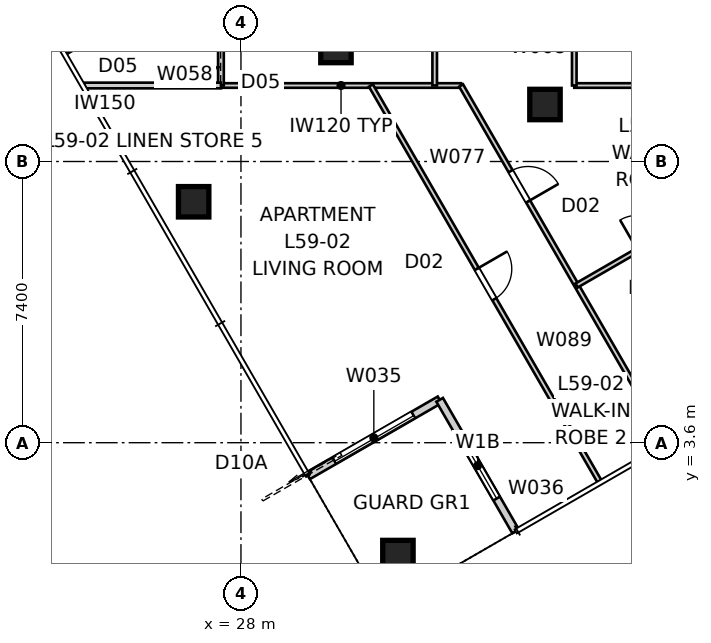
"""IFC4 building model, lengths in metres.
Left out: names, types, materials, properties, quantities, classifications, styles, units other than length and angle.
Written with IfcOpenShell. Run it as: python <this file> out.ifc"""

import sys

from ifc_helpers import new_model, si_unit, direction, frame, frame_2d, origin, origin_2d, place, context, subcontext, project, spatial, rectangle, extrude, element, fill, save


model = new_model("IFC4")
c1 = context("Model", 3, precision=1e-05, world=origin(), true_north=direction((0.0, 1.0)))
c2 = subcontext(c1, "Body", "Model", "MODEL_VIEW")
j1 = project(units=[si_unit("LENGTHUNIT", "METRE"), si_unit("PLANEANGLEUNIT", "RADIAN")], contexts=[c1])
p1 = place(None, origin())
s1 = spatial("IfcSite", under=j1, at=p1, CompositionType="ELEMENT")
p2 = place(p1, origin())
s2 = spatial("IfcBuilding", under=s1, at=p2, CompositionType="ELEMENT")
p3 = place(p2, frame((0.0, 0.0, 215.0)))
s3 = spatial("IfcBuildingStorey", under=s2, at=p3, CompositionType="ELEMENT", Elevation=215.0)
for number, where, z_axis, x_axis in (
    (1, (32.13, 0.63, 0.0), (0.0, 0.0, 1.0), (1.0, 0.0, 0.0)),
    (2, (26.755, 9.94, 0.0), (0.0, 0.0, 1.0), (1.0, 0.0, 0.0)),
    (3, (30.5, 14.0, 0.0), (0.0, 0.0, 1.0), (1.0, 0.0, 0.0)),
    (4, (36.0, 12.5, 0.0), (0.0, 0.0, 1.0), (1.0, 0.0, 0.0)),
):
    element("IfcColumn", number, at=place(p3, frame(where, z_axis=z_axis, x_axis=x_axis)), inside=s3, PredefinedType="COLUMN", context=c2, shape_type="SweptSolid", body=[
        extrude(rectangle(XDim=0.8, YDim=0.8, at=origin_2d()), origin(), (0.0, 0.0, 1.0), 3.4),
    ])
p4 = place(p3, frame((29.764, 2.729, 0.0), z_axis=(0.0, 0.0, 1.0), x_axis=(0.866026010844, 0.49999894854, 0.0)))
e5 = element("IfcWall", 5, at=p4, inside=s3, PredefinedType="SOLIDWALL", context=c2, shape_type="SweptSolid", body=[
    extrude(rectangle(XDim=4.0, YDim=0.2, at=frame_2d((2.0, 0.0))), origin(), (0.0, 0.0, 1.0), 3.25),
])
p5 = place(p4, frame((0.8, 0.0, 0.0)))
e6 = element("IfcOpeningElement", 6, at=p5, cuts=e5, PredefinedType="OPENING", context=c2, shape_type="SweptSolid", body=[
    extrude(rectangle(XDim=2.4, YDim=2.1, at=frame_2d((1.2, 1.05))), frame((0.0, 0.11, 0.0), z_axis=(0.0, -1.0, 0.0), x_axis=(1.0, 0.0, 0.0)), (0.0, 0.0, 1.0), 0.22),
])
p6 = place(p3, frame((33.229, 4.729, 0.0), z_axis=(0.0, 0.0, 1.0), x_axis=(0.49999894854, -0.866026010844, 0.0)))
e7 = element("IfcWall", 7, at=p6, inside=s3, PredefinedType="SOLIDWALL", context=c2, shape_type="SweptSolid", body=[
    extrude(rectangle(XDim=4.0, YDim=0.2, at=frame_2d((2.0, 0.0))), origin(), (0.0, 0.0, 1.0), 3.25),
])
p7 = place(p6, frame((1.0, 0.0, 0.45)))
e8 = element("IfcOpeningElement", 8, at=p7, cuts=e7, PredefinedType="OPENING", context=c2, shape_type="SweptSolid", body=[
    extrude(rectangle(XDim=2.0, YDim=1.8, at=frame_2d((1.0, 0.9))), frame((0.0, 0.11, 0.0), z_axis=(0.0, -1.0, 0.0), x_axis=(1.0, 0.0, 0.0)), (0.0, 0.0, 1.0), 0.22),
])
p8 = place(p3, frame((33.793, 13.0, 0.0), z_axis=(0.0, 0.0, 1.0), x_axis=(-1.0, 0.0, 0.0)))
e9 = element("IfcWall", 9, at=p8, inside=s3, PredefinedType="PARTITIONING", context=c2, shape_type="SweptSolid", body=[
    extrude(rectangle(XDim=6.32, YDim=0.12, at=frame_2d((3.16, 0.0))), origin(), (0.0, 0.0, 1.0), 3.25),
])
p9 = place(p3, frame((33.098, 17.9, 0.0), z_axis=(0.0, 0.0, 1.0), x_axis=(0.0, -1.0, 0.0)))
e10 = element("IfcWall", 10, at=p9, inside=s3, PredefinedType="PARTITIONING", context=c2, shape_type="SweptSolid", body=[
    extrude(rectangle(XDim=4.9, YDim=0.12, at=frame_2d((2.45, 0.0))), origin(), (0.0, 0.0, 1.0), 3.25),
])
p10 = place(p9, frame((3.018, 0.0, 0.0)))
e11 = element("IfcOpeningElement", 11, at=p10, cuts=e10, PredefinedType="OPENING", context=c2, shape_type="SweptSolid", body=[
    extrude(rectangle(XDim=0.96, YDim=2.1, at=frame_2d((0.48, 1.05))), frame((0.0, 0.07, 0.0), z_axis=(0.0, -1.0, 0.0), x_axis=(1.0, 0.0, 0.0)), (0.0, 0.0, 1.0), 0.14),
])
p11 = place(p9, frame((0.588, 0.0, 0.0)))
e12 = element("IfcOpeningElement", 12, at=p11, cuts=e10, PredefinedType="OPENING", context=c2, shape_type="SweptSolid", body=[
    extrude(rectangle(XDim=0.92, YDim=2.34, at=frame_2d((0.46, 1.17))), frame((0.0, 0.07, 0.0), z_axis=(0.0, -1.0, 0.0), x_axis=(1.0, 0.0, 0.0)), (0.0, 0.0, 1.0), 0.14),
])
p12 = place(p3, frame((27.473, 13.0, 0.0), z_axis=(0.0, 0.0, 1.0), x_axis=(0.0, 1.0, 0.0)))
e13 = element("IfcWall", 13, at=p12, inside=s3, PredefinedType="SOLIDWALL", context=c2, shape_type="SweptSolid", body=[
    extrude(rectangle(XDim=3.314, YDim=0.15, at=frame_2d((1.657, 0.0))), origin(), (0.0, 0.0, 1.0), 3.25),
])
p13 = place(p12, frame((0.922, 0.0, 0.0)))
e14 = element("IfcOpeningElement", 14, at=p13, cuts=e13, PredefinedType="OPENING", context=c2, shape_type="SweptSolid", body=[
    extrude(rectangle(XDim=0.96, YDim=2.1, at=frame_2d((0.48, 1.05))), frame((0.0, 0.085, 0.0), z_axis=(0.0, -1.0, 0.0), x_axis=(1.0, 0.0, 0.0)), (0.0, 0.0, 1.0), 0.17),
])
p14 = place(p3, frame((27.473, 16.256, 0.0), z_axis=(0.0, 0.0, 1.0), x_axis=(-0.866047486323, -0.49996174997, 0.0)))
e15 = element("IfcWall", 15, at=p14, inside=s3, PredefinedType="SOLIDWALL", context=c2, shape_type="SweptSolid", body=[
    extrude(rectangle(XDim=4.74, YDim=0.15, at=frame_2d((2.37, 0.0))), origin(), (0.0, 0.0, 1.0), 3.25),
])
p15 = place(p14, frame((1.91, 0.0, 0.0)))
e16 = element("IfcOpeningElement", 16, at=p15, cuts=e15, PredefinedType="OPENING", context=c2, shape_type="SweptSolid", body=[
    extrude(rectangle(XDim=0.96, YDim=2.1, at=frame_2d((0.48, 1.05))), frame((0.0, 0.085, 0.0), z_axis=(0.0, -1.0, 0.0), x_axis=(1.0, 0.0, 0.0)), (0.0, 0.0, 1.0), 0.17),
])
p16 = place(p3, frame((39.192, 13.0, 0.0), z_axis=(0.0, 0.0, 1.0), x_axis=(-1.0, 0.0, 0.0)))
e17 = element("IfcWall", 17, at=p16, inside=s3, PredefinedType="PARTITIONING", context=c2, shape_type="SweptSolid", body=[
    extrude(rectangle(XDim=2.421, YDim=0.12, at=frame_2d((1.21, 0.0))), origin(), (0.0, 0.0, 1.0), 3.25),
])
p17 = place(p3, frame((36.771, 13.0, 0.0), z_axis=(0.0, 0.0, 1.0), x_axis=(0.0, 1.0, 0.0)))
e18 = element("IfcWall", 18, at=p17, inside=s3, PredefinedType="PARTITIONING", context=c2, shape_type="SweptSolid", body=[
    extrude(rectangle(XDim=4.9, YDim=0.12, at=frame_2d((2.45, 0.0))), origin(), (0.0, 0.0, 1.0), 3.25),
])
p18 = place(p17, frame((1.97, 0.0, 0.0)))
e19 = element("IfcOpeningElement", 19, at=p18, cuts=e18, PredefinedType="OPENING", context=c2, shape_type="SweptSolid", body=[
    extrude(rectangle(XDim=0.96, YDim=2.1, at=frame_2d((0.48, 1.05))), frame((0.0, 0.07, 0.0), z_axis=(0.0, -1.0, 0.0), x_axis=(1.0, 0.0, 0.0)), (0.0, 0.0, 1.0), 0.14),
])
p19 = place(p3, frame((31.419, 13.0, 0.0), z_axis=(0.0, 0.0, 1.0), x_axis=(0.499996550604, -0.866027395285, 0.0)))
e20 = element("IfcWall", 20, at=p19, inside=s3, PredefinedType="PARTITIONING", context=c2, shape_type="SweptSolid", body=[
    extrude(rectangle(XDim=12.028, YDim=0.12, at=frame_2d((6.014, 0.0))), origin(), (0.0, 0.0, 1.0), 3.25),
])
p20 = place(p19, frame((5.574, 0.0, 0.0)))
e21 = element("IfcOpeningElement", 21, at=p20, cuts=e20, PredefinedType="OPENING", context=c2, shape_type="SweptSolid", body=[
    extrude(rectangle(XDim=0.92, YDim=2.34, at=frame_2d((0.46, 1.17))), frame((0.0, 0.07, 0.0), z_axis=(0.0, -1.0, 0.0), x_axis=(1.0, 0.0, 0.0)), (0.0, 0.0, 1.0), 0.14),
])
p21 = place(p3, frame((23.88, 13.0, 0.0), z_axis=(0.0, 0.0, 1.0), x_axis=(1.0, 0.0, 0.0)))
e22 = element("IfcWall", 22, at=p21, inside=s3, PredefinedType="SOLIDWALL", context=c2, shape_type="SweptSolid", body=[
    extrude(rectangle(XDim=3.593, YDim=0.15, at=frame_2d((1.796, 0.0))), origin(), (0.0, 0.0, 1.0), 3.25),
])
p22 = place(p3, frame((33.793, 13.0, 0.0), z_axis=(0.0, 0.0, 1.0), x_axis=(0.499999922276, -0.866025448659, 0.0)))
e23 = element("IfcWall", 23, at=p22, inside=s3, PredefinedType="PARTITIONING", context=c2, shape_type="SweptSolid", body=[
    extrude(rectangle(XDim=10.841, YDim=0.12, at=frame_2d((5.42, 0.0))), origin(), (0.0, 0.0, 1.0), 3.25),
])
p23 = place(p22, frame((2.604, 0.0, 0.0)))
e24 = element("IfcOpeningElement", 24, at=p23, cuts=e23, PredefinedType="OPENING", context=c2, shape_type="SweptSolid", body=[
    extrude(rectangle(XDim=0.92, YDim=2.34, at=frame_2d((0.46, 1.17))), frame((0.0, 0.07, 0.0), z_axis=(0.0, -1.0, 0.0), x_axis=(1.0, 0.0, 0.0)), (0.0, 0.0, 1.0), 0.14),
])
p24 = place(p3, frame((36.832, 7.737, 0.0), z_axis=(0.0, 0.0, 1.0), x_axis=(0.866014397438, 0.500019063067, 0.0)))
e25 = element("IfcWall", 25, at=p24, inside=s3, PredefinedType="PARTITIONING", context=c2, shape_type="SweptSolid", body=[
    extrude(rectangle(XDim=5.035, YDim=0.12, at=frame_2d((2.518, 0.0))), origin(), (0.0, 0.0, 1.0), 3.25),
])
p25 = place(p24, frame((1.853, 0.0, 0.0)))
e26 = element("IfcOpeningElement", 26, at=p25, cuts=e25, PredefinedType="OPENING", context=c2, shape_type="SweptSolid", body=[
    extrude(rectangle(XDim=0.92, YDim=2.34, at=frame_2d((0.46, 1.17))), frame((0.0, 0.07, 0.0), z_axis=(0.0, -1.0, 0.0), x_axis=(1.0, 0.0, 0.0)), (0.0, 0.0, 1.0), 0.14),
])
p26 = place(p5, origin())
e27 = element("IfcDoor", 27, at=p26, inside=s3, OperationType="SLIDING_TO_LEFT", PredefinedType="DOOR", context=c2, shape_type="SweptSolid", body=[
    extrude(rectangle(XDim=2.4, YDim=2.1, at=frame_2d((1.2, 1.05))), frame((0.0, 0.025, 0.0), z_axis=(0.0, -1.0, 0.0), x_axis=(1.0, 0.0, 0.0)), (0.0, 0.0, 1.0), 0.05),
])
fill(e6, e27)
p27 = place(p7, origin())
e28 = element("IfcWindow", 28, at=p27, inside=s3, PartitioningType="SINGLE_PANEL", PredefinedType="WINDOW", context=c2, shape_type="SweptSolid", body=[
    extrude(rectangle(XDim=2.0, YDim=1.8, at=frame_2d((1.0, 0.9))), frame((0.0, 0.03, 0.0), z_axis=(0.0, -1.0, 0.0), x_axis=(1.0, 0.0, 0.0)), (0.0, 0.0, 1.0), 0.06),
])
fill(e8, e28)
p28 = place(p23, origin())
e29 = element("IfcDoor", 29, at=p28, inside=s3, OperationType="SINGLE_SWING_RIGHT", PredefinedType="DOOR", context=c2, shape_type="SweptSolid", body=[
    extrude(rectangle(XDim=0.92, YDim=2.34, at=frame_2d((0.46, 1.17))), frame((0.0, 0.025, 0.0), z_axis=(0.0, -1.0, 0.0), x_axis=(1.0, 0.0, 0.0)), (0.0, 0.0, 1.0), 0.05),
])
fill(e24, e29)
p29 = place(p20, origin())
e30 = element("IfcDoor", 30, at=p29, inside=s3, OperationType="SINGLE_SWING_LEFT", PredefinedType="DOOR", context=c2, shape_type="SweptSolid", body=[
    extrude(rectangle(XDim=0.92, YDim=2.34, at=frame_2d((0.46, 1.17))), frame((0.0, 0.025, 0.0), z_axis=(0.0, -1.0, 0.0), x_axis=(1.0, 0.0, 0.0)), (0.0, 0.0, 1.0), 0.05),
])
fill(e21, e30)
save(model, sys.argv[1])
